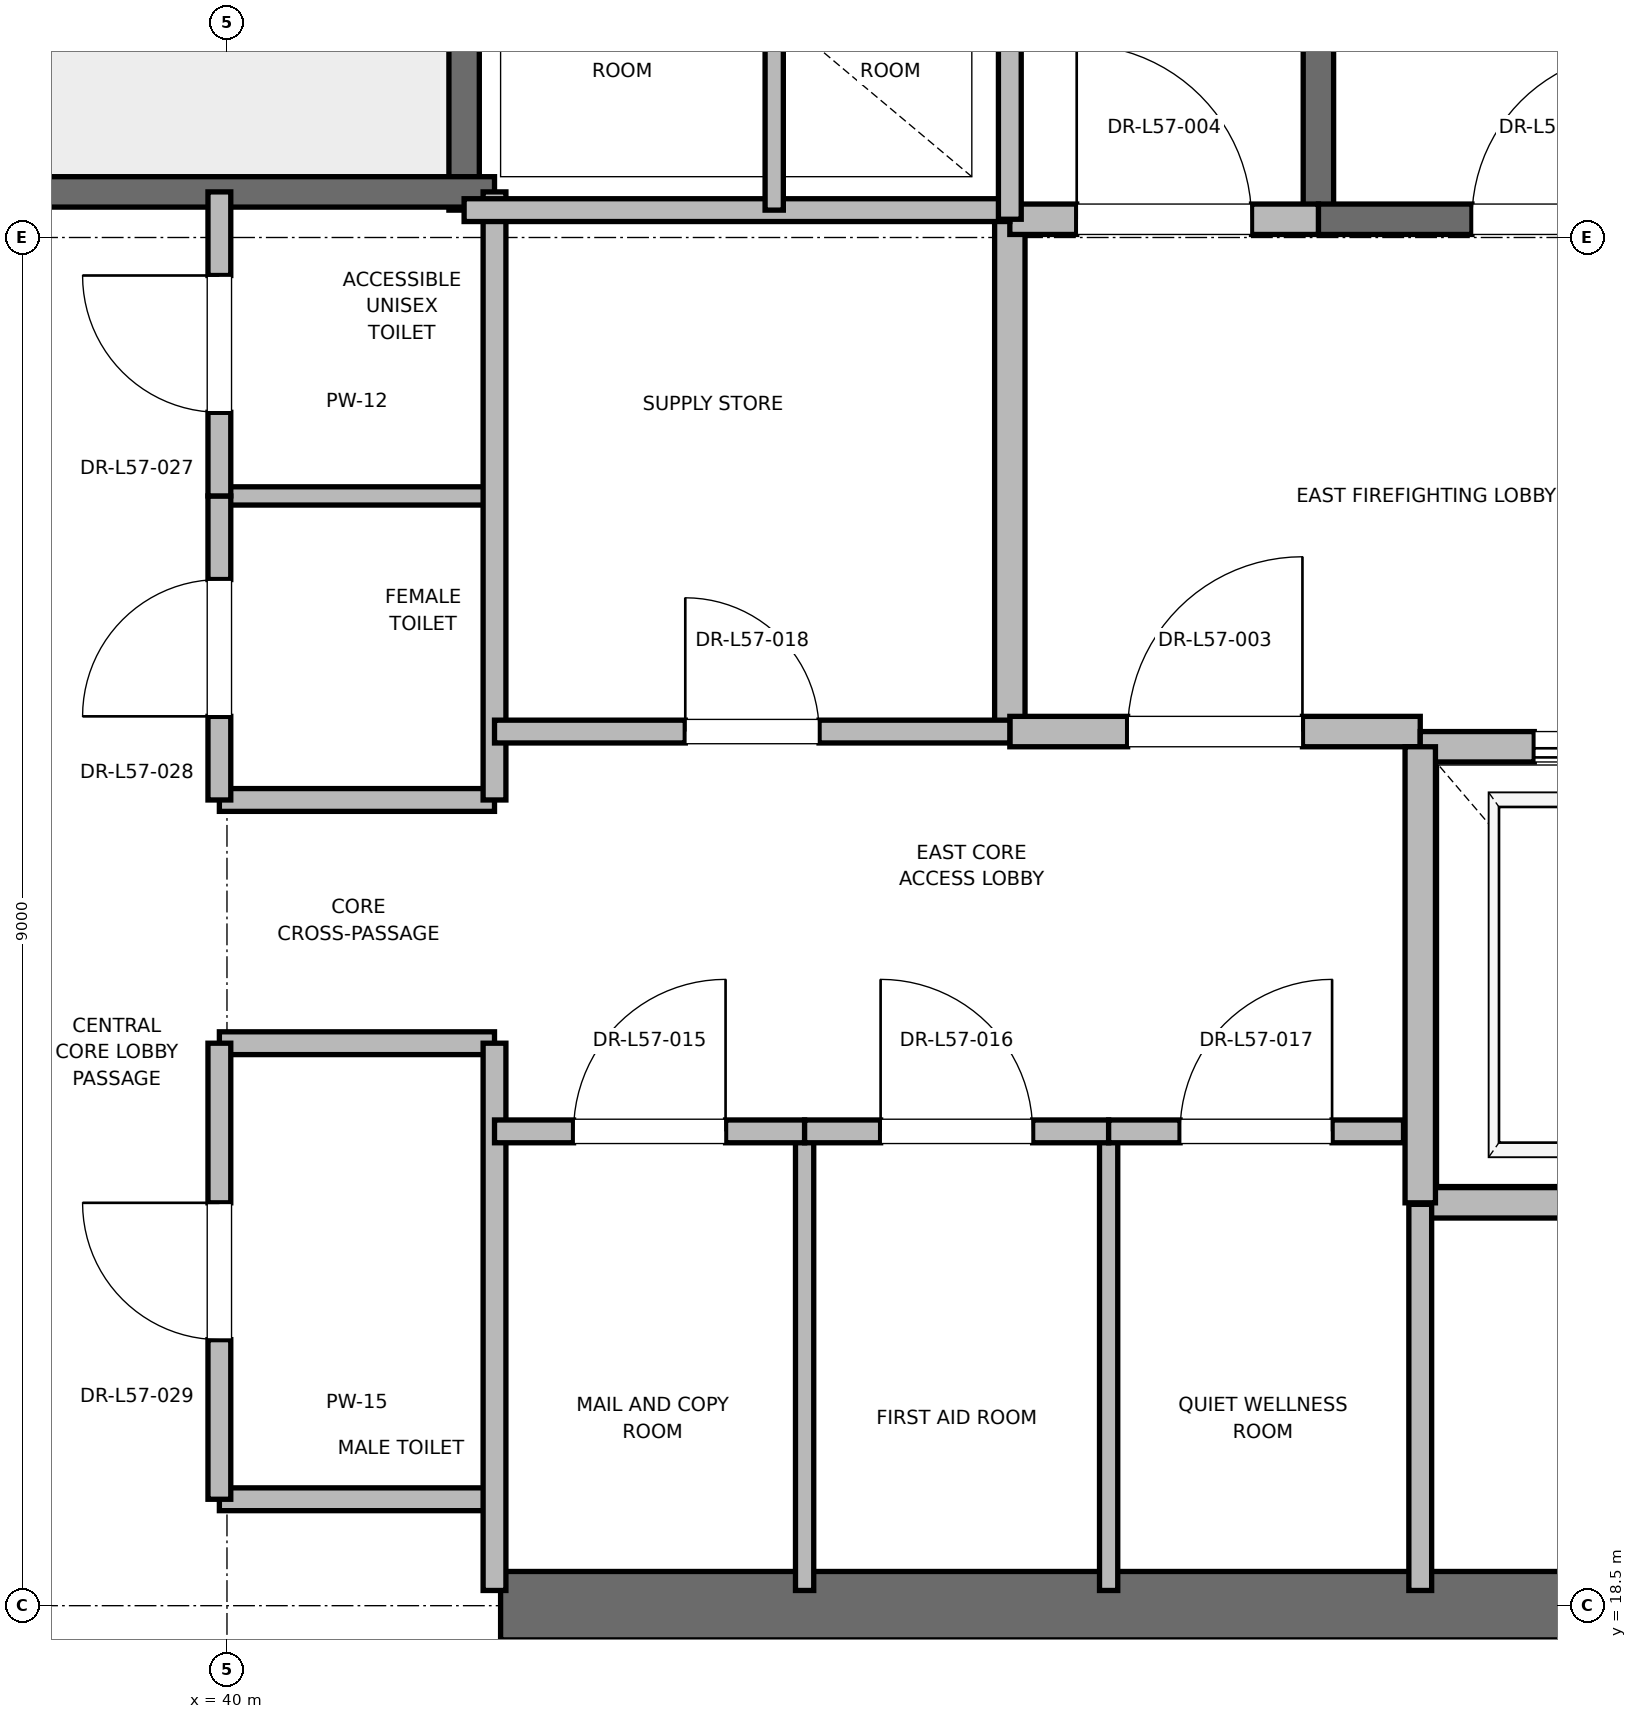
"""IFC4 building model, lengths in metres.
Left out: names, types, materials, properties, quantities, classifications, styles, units other than length and angle.
Written with IfcOpenShell. Run it as: python <this file> out.ifc"""

import sys

from ifc_helpers import new_model, si_unit, direction, frame, frame_2d, origin, place, context, subcontext, project, spatial, rectangle, extrude, element, fill, save


model = new_model("IFC4")
c1 = context("Model", 3, precision=1e-05, world=origin(), true_north=direction((0.0, 1.0)))
c2 = subcontext(c1, "Body", "Model", "MODEL_VIEW")
j1 = project(units=[si_unit("LENGTHUNIT", "METRE"), si_unit("PLANEANGLEUNIT", "RADIAN")], contexts=[c1])
p1 = place(None, origin())
s1 = spatial("IfcSite", under=j1, at=p1, CompositionType="ELEMENT")
p2 = place(p1, origin())
s2 = spatial("IfcBuilding", under=s1, at=p2, CompositionType="ELEMENT")
p3 = place(p2, frame((0.0, 0.0, 247.2)))
s3 = spatial("IfcBuildingStorey", under=s2, at=p3, CompositionType="ELEMENT", Elevation=247.2)
p4 = place(p3, frame((41.8, 18.5, 0.0), z_axis=(0.0, 0.0, 1.0), x_axis=(1.0, 0.0, 0.0)))
e1 = element("IfcWall", 1, at=p4, inside=s3, PredefinedType="SHEAR", context=c2, shape_type="SweptSolid", body=[
    extrude(rectangle(XDim=9.2, YDim=0.45, at=frame_2d((4.6, 0.0))), origin(), (0.0, 0.0, 1.0), 3.785),
])
p5 = place(p3, frame((47.18, 27.62, 0.0), z_axis=(0.0, 0.0, 1.0), x_axis=(0.0, 1.0, 0.0)))
e2 = element("IfcWall", 2, at=p5, inside=s3, PredefinedType="SOLIDWALL", context=c2, shape_type="SweptSolid", body=[
    extrude(rectangle(XDim=8.18, YDim=0.2, at=frame_2d((4.09, 0.0))), origin(), (0.0, 0.0, 1.0), 3.785),
])
p6 = place(p3, frame((47.18, 27.62, 0.0), z_axis=(0.0, 0.0, 1.0), x_axis=(1.0, 0.0, 0.0)))
e3 = element("IfcWall", 3, at=p6, inside=s3, PredefinedType="SOLIDWALL", context=c2, shape_type="SweptSolid", body=[
    extrude(rectangle(XDim=3.12, YDim=0.2, at=frame_2d((1.56, 0.0))), origin(), (0.0, 0.0, 1.0), 3.785),
])
p7 = place(p6, frame((1.01, 0.0, 0.0)))
e4 = element("IfcOpeningElement", 4, at=p7, cuts=e3, PredefinedType="OPENING", context=c2, shape_type="SweptSolid", body=[
    extrude(rectangle(XDim=1.1, YDim=2.15, at=frame_2d((0.55, 1.075))), frame((0.0, 0.1, 0.0), z_axis=(0.0, -1.0, 0.0), x_axis=(1.0, 0.0, 0.0)), (0.0, 0.0, 1.0), 0.2),
])
p8 = place(p3, frame((41.56, 27.68, 0.0), z_axis=(0.0, 0.0, 1.0), x_axis=(0.0, 1.0, 0.0)))
e5 = element("IfcWall", 5, at=p8, inside=s3, PredefinedType="SOLIDWALL", context=c2, shape_type="SweptSolid", body=[
    extrude(rectangle(XDim=8.57, YDim=0.2, at=frame_2d((4.285, 0.0))), origin(), (0.0, 0.0, 1.0), 3.785),
])
p9 = place(p3, frame((38.44, 27.8, 0.0), z_axis=(0.0, 0.0, 1.0), x_axis=(1.0, 0.0, 0.0)))
e6 = element("IfcWall", 6, at=p9, inside=s3, PredefinedType="SOLIDWALL", context=c2, shape_type="SweptSolid", body=[
    extrude(rectangle(XDim=3.32, YDim=0.2, at=frame_2d((1.66, 0.0))), origin(), (0.0, 0.0, 1.0), 3.785),
])
p10 = place(p3, frame((45.15, 24.25, 0.0), z_axis=(0.0, 0.0, 1.0), x_axis=(0.0, 1.0, 0.0)))
e7 = element("IfcWall", 7, at=p10, inside=s3, PredefinedType="PARTITIONING", context=c2, shape_type="SweptSolid", body=[
    extrude(rectangle(XDim=3.37, YDim=0.2, at=frame_2d((1.685, 0.0))), origin(), (0.0, 0.0, 1.0), 3.785),
])
p11 = place(p3, frame((45.15, 24.25, 0.0), z_axis=(0.0, 0.0, 1.0), x_axis=(1.0, 0.0, 0.0)))
e8 = element("IfcWall", 8, at=p11, inside=s3, PredefinedType="PARTITIONING", context=c2, shape_type="SweptSolid", body=[
    extrude(rectangle(XDim=2.7, YDim=0.2, at=frame_2d((1.35, 0.0))), origin(), (0.0, 0.0, 1.0), 3.785),
])
p12 = place(p11, frame((0.775, 0.0, 0.0)))
e9 = element("IfcOpeningElement", 9, at=p12, cuts=e8, PredefinedType="OPENING", context=c2, shape_type="SweptSolid", body=[
    extrude(rectangle(XDim=1.15, YDim=2.2, at=frame_2d((0.575, 1.1))), frame((0.0, 0.1, 0.0), z_axis=(0.0, -1.0, 0.0), x_axis=(1.0, 0.0, 0.0)), (0.0, 0.0, 1.0), 0.2),
])
p13 = place(p3, frame((45.15, 27.62, 0.0), z_axis=(0.0, 0.0, 1.0), x_axis=(1.0, 0.0, 0.0)))
e10 = element("IfcWall", 10, at=p13, inside=s3, PredefinedType="PARTITIONING", context=c2, shape_type="SweptSolid", body=[
    extrude(rectangle(XDim=2.03, YDim=0.2, at=frame_2d((1.015, 0.0))), origin(), (0.0, 0.0, 1.0), 3.785),
])
p14 = place(p13, frame((0.44, 0.0, 0.0)))
e11 = element("IfcOpeningElement", 11, at=p14, cuts=e10, PredefinedType="OPENING", context=c2, shape_type="SweptSolid", body=[
    extrude(rectangle(XDim=1.15, YDim=2.2, at=frame_2d((0.575, 1.1))), frame((0.0, 0.1, 0.0), z_axis=(0.0, -1.0, 0.0), x_axis=(1.0, 0.0, 0.0)), (0.0, 0.0, 1.0), 0.2),
])
p15 = place(p3, frame((47.85, 21.15, 0.0), z_axis=(0.0, 0.0, 1.0), x_axis=(1.0, 0.0, 0.0)))
e12 = element("IfcWall", 12, at=p15, inside=s3, PredefinedType="SOLIDWALL", context=c2, shape_type="SweptSolid", body=[
    extrude(rectangle(XDim=2.6, YDim=0.2, at=frame_2d((1.3, 0.0))), origin(), (0.0, 0.0, 1.0), 3.785),
])
p16 = place(p3, frame((50.45, 24.15, 0.0), z_axis=(0.0, 0.0, 1.0), x_axis=(-1.0, 0.0, 0.0)))
e13 = element("IfcWall", 13, at=p16, inside=s3, PredefinedType="SOLIDWALL", context=c2, shape_type="SweptSolid", body=[
    extrude(rectangle(XDim=2.6, YDim=0.2, at=frame_2d((1.3, 0.0))), origin(), (0.0, 0.0, 1.0), 2.865),
])
p17 = place(p16, frame((0.75, 0.0, 0.0)))
e14 = element("IfcOpeningElement", 14, at=p17, cuts=e13, PredefinedType="OPENING", context=c2, shape_type="SweptSolid", body=[
    extrude(rectangle(XDim=1.1, YDim=2.2, at=frame_2d((0.55, 1.1))), frame((0.0, 0.1, 0.0), z_axis=(0.0, -1.0, 0.0), x_axis=(1.0, 0.0, 0.0)), (0.0, 0.0, 1.0), 0.2),
])
p18 = place(p3, frame((47.85, 24.15, 0.0), z_axis=(0.0, 0.0, 1.0), x_axis=(0.0, -1.0, 0.0)))
e15 = element("IfcWall", 15, at=p18, inside=s3, PredefinedType="SOLIDWALL", context=c2, shape_type="SweptSolid", body=[
    extrude(rectangle(XDim=3.0, YDim=0.2, at=frame_2d((1.5, 0.0))), origin(), (0.0, 0.0, 1.0), 3.785),
])
for number, where, z_axis, x_axis in (
    (16, (39.95, 19.2, 0.0), (0.0, 0.0, 1.0), (1.0, 0.0, 0.0)),
    (17, (39.95, 22.2, 0.0), (0.0, 0.0, 1.0), (1.0, 0.0, 0.0)),
    (18, (39.95, 23.8, 0.0), (0.0, 0.0, 1.0), (1.0, 0.0, 0.0)),
):
    element("IfcWall", number, at=place(p3, frame(where, z_axis=z_axis, x_axis=x_axis)), inside=s3, PredefinedType="PARTITIONING", context=c2, shape_type="SweptSolid", body=[
        extrude(rectangle(XDim=1.81, YDim=0.15, at=frame_2d((0.905, 0.0))), origin(), (0.0, 0.0, 1.0), 2.85),
    ])
p19 = place(p3, frame((39.95, 25.8, 0.0), z_axis=(0.0, 0.0, 1.0), x_axis=(1.0, 0.0, 0.0)))
e19 = element("IfcWall", 19, at=p19, inside=s3, PredefinedType="PARTITIONING", context=c2, shape_type="SweptSolid", body=[
    extrude(rectangle(XDim=1.81, YDim=0.12, at=frame_2d((0.905, 0.0))), origin(), (0.0, 0.0, 1.0), 2.85),
])
p20 = place(p3, frame((41.76, 18.6, 0.0), z_axis=(0.0, 0.0, 1.0), x_axis=(0.0, 1.0, 0.0)))
e20 = element("IfcWall", 20, at=p20, inside=s3, PredefinedType="PARTITIONING", context=c2, shape_type="SweptSolid", body=[
    extrude(rectangle(XDim=3.6, YDim=0.15, at=frame_2d((1.8, 0.0))), origin(), (0.0, 0.0, 1.0), 2.85),
])
p21 = place(p3, frame((41.76, 23.8, 0.0), z_axis=(0.0, 0.0, 1.0), x_axis=(0.0, 1.0, 0.0)))
e21 = element("IfcWall", 21, at=p21, inside=s3, PredefinedType="PARTITIONING", context=c2, shape_type="SweptSolid", body=[
    extrude(rectangle(XDim=4.0, YDim=0.15, at=frame_2d((2.0, 0.0))), origin(), (0.0, 0.0, 1.0), 2.85),
])
p22 = place(p3, frame((39.95, 19.2, 0.0), z_axis=(0.0, 0.0, 1.0), x_axis=(0.0, 1.0, 0.0)))
e22 = element("IfcWall", 22, at=p22, inside=s3, PredefinedType="PARTITIONING", context=c2, shape_type="SweptSolid", body=[
    extrude(rectangle(XDim=3.0, YDim=0.15, at=frame_2d((1.5, 0.0))), origin(), (0.0, 0.0, 1.0), 2.85),
])
p23 = place(p22, frame((1.05, 0.0, 0.0)))
e23 = element("IfcOpeningElement", 23, at=p23, cuts=e22, PredefinedType="OPENING", context=c2, shape_type="SweptSolid", body=[
    extrude(rectangle(XDim=0.9, YDim=2.1, at=frame_2d((0.45, 1.05))), frame((0.0, 0.075, 0.0), z_axis=(0.0, -1.0, 0.0), x_axis=(1.0, 0.0, 0.0)), (0.0, 0.0, 1.0), 0.15),
])
p24 = place(p3, frame((39.95, 23.8, 0.0), z_axis=(0.0, 0.0, 1.0), x_axis=(0.0, 1.0, 0.0)))
e24 = element("IfcWall", 24, at=p24, inside=s3, PredefinedType="PARTITIONING", context=c2, shape_type="SweptSolid", body=[
    extrude(rectangle(XDim=2.0, YDim=0.15, at=frame_2d((1.0, 0.0))), origin(), (0.0, 0.0, 1.0), 2.85),
])
p25 = place(p24, frame((0.55, 0.0, 0.0)))
e25 = element("IfcOpeningElement", 25, at=p25, cuts=e24, PredefinedType="OPENING", context=c2, shape_type="SweptSolid", body=[
    extrude(rectangle(XDim=0.9, YDim=2.1, at=frame_2d((0.45, 1.05))), frame((0.0, 0.075, 0.0), z_axis=(0.0, -1.0, 0.0), x_axis=(1.0, 0.0, 0.0)), (0.0, 0.0, 1.0), 0.15),
])
p26 = place(p3, frame((39.95, 25.8, 0.0), z_axis=(0.0, 0.0, 1.0), x_axis=(0.0, 1.0, 0.0)))
e26 = element("IfcWall", 26, at=p26, inside=s3, PredefinedType="PARTITIONING", context=c2, shape_type="SweptSolid", body=[
    extrude(rectangle(XDim=2.0, YDim=0.15, at=frame_2d((1.0, 0.0))), origin(), (0.0, 0.0, 1.0), 2.85),
])
p27 = place(p26, frame((0.55, 0.0, 0.0)))
e27 = element("IfcOpeningElement", 27, at=p27, cuts=e26, PredefinedType="OPENING", context=c2, shape_type="SweptSolid", body=[
    extrude(rectangle(XDim=0.9, YDim=2.1, at=frame_2d((0.45, 1.05))), frame((0.0, 0.075, 0.0), z_axis=(0.0, -1.0, 0.0), x_axis=(1.0, 0.0, 0.0)), (0.0, 0.0, 1.0), 0.15),
])
p28 = place(p3, frame((41.56, 27.68, 0.0), z_axis=(0.0, 0.0, 1.0), x_axis=(1.0, 0.0, 0.0)))
e28 = element("IfcWall", 28, at=p28, inside=s3, PredefinedType="PARTITIONING", context=c2, shape_type="SweptSolid", body=[
    extrude(rectangle(XDim=3.59, YDim=0.15, at=frame_2d((1.795, 0.0))), origin(), (0.0, 0.0, 1.0), 2.85),
])
p29 = place(p3, frame((47.85, 18.6, 0.0), z_axis=(0.0, 0.0, 1.0), x_axis=(0.0, 1.0, 0.0)))
e29 = element("IfcWall", 29, at=p29, inside=s3, PredefinedType="PARTITIONING", context=c2, shape_type="SweptSolid", body=[
    extrude(rectangle(XDim=2.54, YDim=0.15, at=frame_2d((1.27, 0.0))), origin(), (0.0, 0.0, 1.0), 2.85),
])
for number, where, z_axis, x_axis in (
    (30, (43.8, 18.6, 0.0), (0.0, 0.0, 1.0), (0.0, 1.0, 0.0)),
    (31, (45.8, 18.6, 0.0), (0.0, 0.0, 1.0), (0.0, 1.0, 0.0)),
):
    element("IfcWall", number, at=place(p3, frame(where, z_axis=z_axis, x_axis=x_axis)), inside=s3, PredefinedType="PARTITIONING", context=c2, shape_type="SweptSolid", body=[
        extrude(rectangle(XDim=3.02, YDim=0.12, at=frame_2d((1.51, 0.0))), origin(), (0.0, 0.0, 1.0), 2.85),
    ])
p30 = place(p3, frame((41.76, 21.62, 0.0), z_axis=(0.0, 0.0, 1.0), x_axis=(1.0, 0.0, 0.0)))
e32 = element("IfcWall", 32, at=p30, inside=s3, PredefinedType="PARTITIONING", context=c2, shape_type="SweptSolid", body=[
    extrude(rectangle(XDim=2.04, YDim=0.15, at=frame_2d((1.02, 0.0))), origin(), (0.0, 0.0, 1.0), 2.85),
])
p31 = place(p30, frame((0.52, 0.0, 0.0)))
e33 = element("IfcOpeningElement", 33, at=p31, cuts=e32, PredefinedType="OPENING", context=c2, shape_type="SweptSolid", body=[
    extrude(rectangle(XDim=1.0, YDim=2.15, at=frame_2d((0.5, 1.075))), frame((0.0, 0.075, 0.0), z_axis=(0.0, -1.0, 0.0), x_axis=(1.0, 0.0, 0.0)), (0.0, 0.0, 1.0), 0.15),
])
p32 = place(p3, frame((43.8, 21.62, 0.0), z_axis=(0.0, 0.0, 1.0), x_axis=(1.0, 0.0, 0.0)))
e34 = element("IfcWall", 34, at=p32, inside=s3, PredefinedType="PARTITIONING", context=c2, shape_type="SweptSolid", body=[
    extrude(rectangle(XDim=2.0, YDim=0.15, at=frame_2d((1.0, 0.0))), origin(), (0.0, 0.0, 1.0), 2.85),
])
p33 = place(p32, frame((0.5, 0.0, 0.0)))
e35 = element("IfcOpeningElement", 35, at=p33, cuts=e34, PredefinedType="OPENING", context=c2, shape_type="SweptSolid", body=[
    extrude(rectangle(XDim=1.0, YDim=2.15, at=frame_2d((0.5, 1.075))), frame((0.0, 0.075, 0.0), z_axis=(0.0, -1.0, 0.0), x_axis=(1.0, 0.0, 0.0)), (0.0, 0.0, 1.0), 0.15),
])
p34 = place(p3, frame((45.8, 21.62, 0.0), z_axis=(0.0, 0.0, 1.0), x_axis=(1.0, 0.0, 0.0)))
e36 = element("IfcWall", 36, at=p34, inside=s3, PredefinedType="PARTITIONING", context=c2, shape_type="SweptSolid", body=[
    extrude(rectangle(XDim=1.94, YDim=0.15, at=frame_2d((0.97, 0.0))), origin(), (0.0, 0.0, 1.0), 2.85),
])
p35 = place(p34, frame((0.47, 0.0, 0.0)))
e37 = element("IfcOpeningElement", 37, at=p35, cuts=e36, PredefinedType="OPENING", context=c2, shape_type="SweptSolid", body=[
    extrude(rectangle(XDim=1.0, YDim=2.15, at=frame_2d((0.5, 1.075))), frame((0.0, 0.075, 0.0), z_axis=(0.0, -1.0, 0.0), x_axis=(1.0, 0.0, 0.0)), (0.0, 0.0, 1.0), 0.15),
])
p36 = place(p3, frame((41.76, 24.25, 0.0), z_axis=(0.0, 0.0, 1.0), x_axis=(1.0, 0.0, 0.0)))
e38 = element("IfcWall", 38, at=p36, inside=s3, PredefinedType="PARTITIONING", context=c2, shape_type="SweptSolid", body=[
    extrude(rectangle(XDim=3.39, YDim=0.15, at=frame_2d((1.695, 0.0))), origin(), (0.0, 0.0, 1.0), 2.85),
])
p37 = place(p36, frame((1.255, 0.0, 0.0)))
e39 = element("IfcOpeningElement", 39, at=p37, cuts=e38, PredefinedType="OPENING", context=c2, shape_type="SweptSolid", body=[
    extrude(rectangle(XDim=0.88, YDim=2.1, at=frame_2d((0.44, 1.05))), frame((0.0, 0.075, 0.0), z_axis=(0.0, -1.0, 0.0), x_axis=(1.0, 0.0, 0.0)), (0.0, 0.0, 1.0), 0.15),
])
p38 = place(p3, frame((45.15, 27.62, 0.0), z_axis=(0.0, 0.0, 1.0), x_axis=(0.0, 1.0, 0.0)))
e40 = element("IfcWall", 40, at=p38, inside=s3, PredefinedType="PARTITIONING", context=c2, shape_type="SweptSolid", body=[
    extrude(rectangle(XDim=3.1, YDim=0.15, at=frame_2d((1.55, 0.0))), origin(), (0.0, 0.0, 1.0), 2.85),
])
p39 = place(p3, frame((43.6, 27.68, 0.0), z_axis=(0.0, 0.0, 1.0), x_axis=(0.0, 1.0, 0.0)))
e41 = element("IfcWall", 41, at=p39, inside=s3, PredefinedType="PARTITIONING", context=c2, shape_type="SweptSolid", body=[
    extrude(rectangle(XDim=3.04, YDim=0.12, at=frame_2d((1.52, 0.0))), origin(), (0.0, 0.0, 1.0), 2.85),
])
p40 = place(p7, origin())
e42 = element("IfcDoor", 42, at=p40, inside=s3, OperationType="SINGLE_SWING_RIGHT", PredefinedType="DOOR", context=c2, shape_type="SweptSolid", body=[
    extrude(rectangle(XDim=1.1, YDim=2.15, at=frame_2d((0.55, 1.075))), frame((0.0, 0.025, 0.0), z_axis=(0.0, -1.0, 0.0), x_axis=(1.0, 0.0, 0.0)), (0.0, 0.0, 1.0), 0.05),
])
fill(e4, e42)
p41 = place(p12, origin())
e43 = element("IfcDoor", 43, at=p41, inside=s3, OperationType="SINGLE_SWING_RIGHT", PredefinedType="DOOR", context=c2, shape_type="SweptSolid", body=[
    extrude(rectangle(XDim=1.15, YDim=2.2, at=frame_2d((0.575, 1.1))), frame((0.0, 0.025, 0.0), z_axis=(0.0, -1.0, 0.0), x_axis=(1.0, 0.0, 0.0)), (0.0, 0.0, 1.0), 0.05),
])
fill(e9, e43)
p42 = place(p14, origin())
e44 = element("IfcDoor", 44, at=p42, inside=s3, OperationType="SINGLE_SWING_LEFT", PredefinedType="DOOR", context=c2, shape_type="SweptSolid", body=[
    extrude(rectangle(XDim=1.15, YDim=2.2, at=frame_2d((0.575, 1.1))), frame((0.0, 0.025, 0.0), z_axis=(0.0, -1.0, 0.0), x_axis=(1.0, 0.0, 0.0)), (0.0, 0.0, 1.0), 0.05),
])
fill(e11, e44)
p43 = place(p17, origin())
e45 = element("IfcDoor", 45, at=p43, inside=s3, OperationType="SLIDING_TO_RIGHT", PredefinedType="DOOR", context=c2, shape_type="SweptSolid", body=[
    extrude(rectangle(XDim=1.1, YDim=2.2, at=frame_2d((0.55, 1.1))), frame((0.0, 0.025, 0.0), z_axis=(0.0, -1.0, 0.0), x_axis=(1.0, 0.0, 0.0)), (0.0, 0.0, 1.0), 0.05),
])
fill(e14, e45)
p44 = place(p23, origin())
e46 = element("IfcDoor", 46, at=p44, inside=s3, OperationType="SINGLE_SWING_RIGHT", PredefinedType="DOOR", context=c2, shape_type="SweptSolid", body=[
    extrude(rectangle(XDim=0.9, YDim=2.1, at=frame_2d((0.45, 1.05))), frame((0.0, 0.025, 0.0), z_axis=(0.0, -1.0, 0.0), x_axis=(1.0, 0.0, 0.0)), (0.0, 0.0, 1.0), 0.05),
])
fill(e23, e46)
p45 = place(p25, origin())
e47 = element("IfcDoor", 47, at=p45, inside=s3, OperationType="SINGLE_SWING_LEFT", PredefinedType="DOOR", context=c2, shape_type="SweptSolid", body=[
    extrude(rectangle(XDim=0.9, YDim=2.1, at=frame_2d((0.45, 1.05))), frame((0.0, 0.025, 0.0), z_axis=(0.0, -1.0, 0.0), x_axis=(1.0, 0.0, 0.0)), (0.0, 0.0, 1.0), 0.05),
])
fill(e25, e47)
p46 = place(p27, origin())
e48 = element("IfcDoor", 48, at=p46, inside=s3, OperationType="SINGLE_SWING_RIGHT", PredefinedType="DOOR", context=c2, shape_type="SweptSolid", body=[
    extrude(rectangle(XDim=0.9, YDim=2.1, at=frame_2d((0.45, 1.05))), frame((0.0, 0.025, 0.0), z_axis=(0.0, -1.0, 0.0), x_axis=(1.0, 0.0, 0.0)), (0.0, 0.0, 1.0), 0.05),
])
fill(e27, e48)
p47 = place(p31, origin())
e49 = element("IfcDoor", 49, at=p47, inside=s3, OperationType="SINGLE_SWING_RIGHT", PredefinedType="DOOR", context=c2, shape_type="SweptSolid", body=[
    extrude(rectangle(XDim=1.0, YDim=2.15, at=frame_2d((0.5, 1.075))), frame((0.0, 0.025, 0.0), z_axis=(0.0, -1.0, 0.0), x_axis=(1.0, 0.0, 0.0)), (0.0, 0.0, 1.0), 0.05),
])
fill(e33, e49)
p48 = place(p33, origin())
e50 = element("IfcDoor", 50, at=p48, inside=s3, OperationType="SINGLE_SWING_LEFT", PredefinedType="DOOR", context=c2, shape_type="SweptSolid", body=[
    extrude(rectangle(XDim=1.0, YDim=2.15, at=frame_2d((0.5, 1.075))), frame((0.0, 0.025, 0.0), z_axis=(0.0, -1.0, 0.0), x_axis=(1.0, 0.0, 0.0)), (0.0, 0.0, 1.0), 0.05),
])
fill(e35, e50)
p49 = place(p35, origin())
e51 = element("IfcDoor", 51, at=p49, inside=s3, OperationType="SINGLE_SWING_RIGHT", PredefinedType="DOOR", context=c2, shape_type="SweptSolid", body=[
    extrude(rectangle(XDim=1.0, YDim=2.15, at=frame_2d((0.5, 1.075))), frame((0.0, 0.025, 0.0), z_axis=(0.0, -1.0, 0.0), x_axis=(1.0, 0.0, 0.0)), (0.0, 0.0, 1.0), 0.05),
])
fill(e37, e51)
p50 = place(p37, origin())
e52 = element("IfcDoor", 52, at=p50, inside=s3, OperationType="SINGLE_SWING_LEFT", PredefinedType="DOOR", context=c2, shape_type="SweptSolid", body=[
    extrude(rectangle(XDim=0.88, YDim=2.1, at=frame_2d((0.44, 1.05))), frame((0.0, 0.025, 0.0), z_axis=(0.0, -1.0, 0.0), x_axis=(1.0, 0.0, 0.0)), (0.0, 0.0, 1.0), 0.05),
])
fill(e39, e52)
save(model, sys.argv[1])
